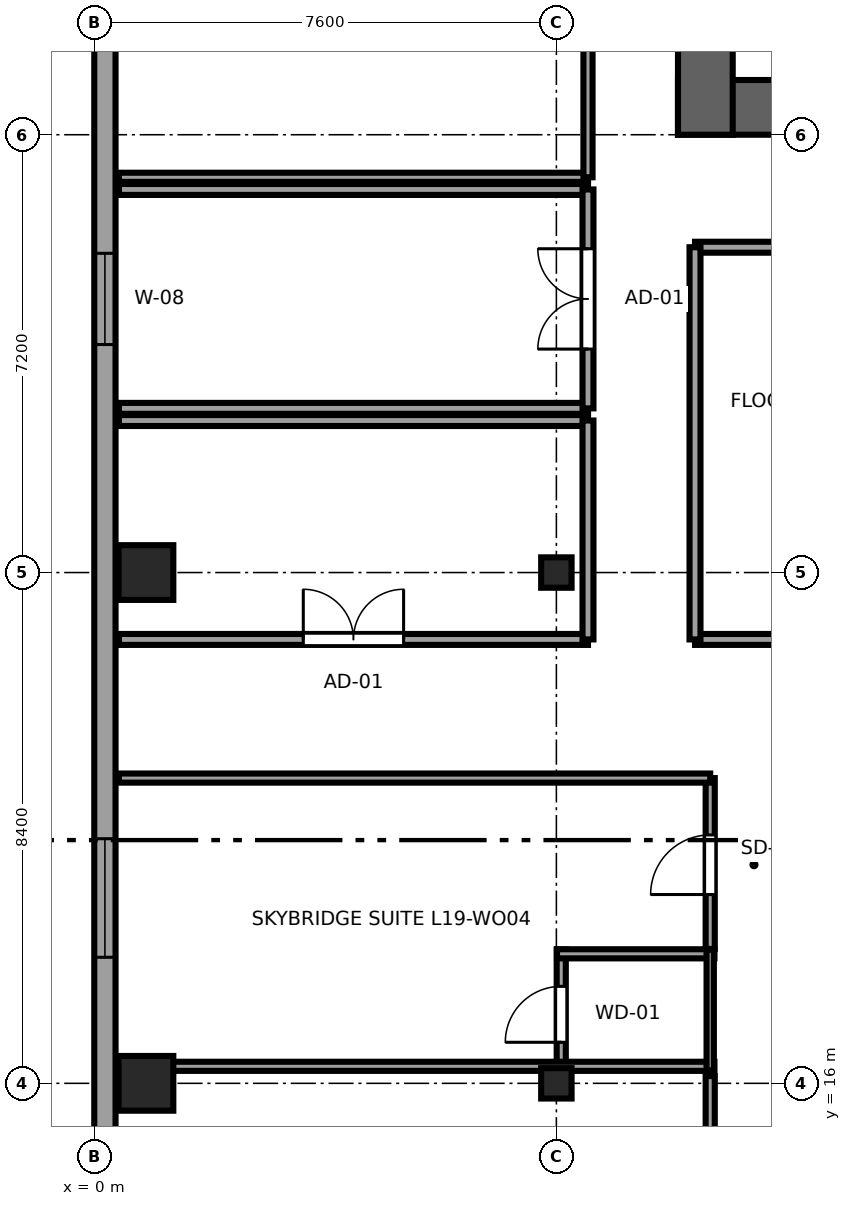
"""IFC4 building model, lengths in metres.
Left out: names, types, materials, properties, quantities, classifications, styles, units other than length and angle.
Written with IfcOpenShell. Run it as: python <this file> out.ifc"""

import sys

from ifc_helpers import new_model, si_unit, direction, frame, frame_2d, origin, origin_2d, place, context, subcontext, project, spatial, rectangle, i_section, extrude, source, transform, mapped, element, fill, save


model = new_model("IFC4")
c1 = context("Model", 3, precision=1e-05, world=origin(), true_north=direction((0.0, 1.0)))
c2 = subcontext(c1, "Body", "Model", "MODEL_VIEW")
j1 = project(units=[si_unit("LENGTHUNIT", "METRE"), si_unit("PLANEANGLEUNIT", "RADIAN")], contexts=[c1])
p1 = place(None, origin())
s1 = spatial("IfcSite", under=j1, at=p1, CompositionType="ELEMENT")
p2 = place(p1, origin())
s2 = spatial("IfcBuilding", under=s1, at=p2, CompositionType="ELEMENT")
p3 = place(p2, frame((0.0, 0.0, 78.15)))
s3 = spatial("IfcBuildingStorey", under=s2, at=p3, CompositionType="ELEMENT", Elevation=78.15)
p4 = place(p3, frame((9.6, 32.05, 0.0), z_axis=(0.0, 0.0, 1.0), x_axis=(1.0, 0.0, 0.0)))
e1 = element("IfcWall", 1, at=p4, inside=s3, PredefinedType="SHEAR", context=c2, shape_type="SweptSolid", body=[
    extrude(rectangle(XDim=26.8, YDim=0.9, at=frame_2d((13.4, 0.0))), origin(), (0.0, 0.0, 1.0), 3.55),
])
p5 = place(p4, frame((6.52, 0.0, 0.0), z_axis=(0.0, 0.0, 1.0), x_axis=(-1.0, 0.0, 0.0)))
e2 = element("IfcOpeningElement", 2, at=p5, cuts=e1, PredefinedType="OPENING", context=c2, shape_type="SweptSolid", body=[
    extrude(rectangle(XDim=1.5, YDim=2.04, at=frame_2d((0.75, 1.02))), frame((0.0, 0.46, 0.0), z_axis=(0.0, -1.0, 0.0), x_axis=(1.0, 0.0, 0.0)), (0.0, 0.0, 1.0), 0.92),
])
p6 = place(p4, frame((14.15, 0.0, 0.0), z_axis=(0.0, 0.0, 1.0), x_axis=(-1.0, 0.0, 0.0)))
e3 = element("IfcOpeningElement", 3, at=p6, cuts=e1, PredefinedType="OPENING", context=c2, shape_type="SweptSolid", body=[
    extrude(rectangle(XDim=1.5, YDim=2.04, at=frame_2d((0.75, 1.02))), frame((0.0, 0.46, 0.0), z_axis=(0.0, -1.0, 0.0), x_axis=(1.0, 0.0, 0.0)), (0.0, 0.0, 1.0), 0.92),
])
p7 = place(p4, frame((20.45, 0.0, 0.0), z_axis=(0.0, 0.0, 1.0), x_axis=(-1.0, 0.0, 0.0)))
e4 = element("IfcOpeningElement", 4, at=p7, cuts=e1, PredefinedType="OPENING", context=c2, shape_type="SweptSolid", body=[
    extrude(rectangle(XDim=1.5, YDim=2.04, at=frame_2d((0.75, 1.02))), frame((0.0, 0.46, 0.0), z_axis=(0.0, -1.0, 0.0), x_axis=(1.0, 0.0, 0.0)), (0.0, 0.0, 1.0), 0.92),
])
p8 = place(p4, frame((8.57, 0.0, 0.0), z_axis=(0.0, 0.0, 1.0), x_axis=(-1.0, 0.0, 0.0)))
e5 = element("IfcOpeningElement", 5, at=p8, cuts=e1, PredefinedType="OPENING", context=c2, shape_type="SweptSolid", body=[
    extrude(rectangle(XDim=0.82, YDim=2.01, at=frame_2d((0.41, 1.005))), frame((0.0, 0.46, 0.0), z_axis=(0.0, -1.0, 0.0), x_axis=(1.0, 0.0, 0.0)), (0.0, 0.0, 1.0), 0.92),
])
p9 = place(p3, frame((10.05, 31.6, 0.0), z_axis=(0.0, 0.0, 1.0), x_axis=(0.0, 1.0, 0.0)))
e6 = element("IfcWall", 6, at=p9, inside=s3, PredefinedType="SHEAR", context=c2, shape_type="SweptSolid", body=[
    extrude(rectangle(XDim=13.6, YDim=0.9, at=frame_2d((6.8, 0.0))), origin(), (0.0, 0.0, 1.0), 3.55),
])
m1 = source(origin(), c2, "Body", "SweptSolid", [
    extrude(rectangle(XDim=0.9, YDim=0.9, at=origin_2d()), origin(), (0.0, 0.0, 1.0), 3.55),
])
for number, where, z_axis, x_axis in (
    (7, (0.85, 16.0, 0.0), (0.0, 0.0, 1.0), (1.0, 0.0, 0.0)),
    (8, (0.85, 24.4, 0.0), (0.0, 0.0, 1.0), (1.0, 0.0, 0.0)),
):
    element("IfcColumn", number, at=place(p3, frame(where, z_axis=z_axis, x_axis=x_axis)), inside=s3, PredefinedType="COLUMN", context=c2, shape_type="MappedRepresentation", body=[
        mapped(m1, transform((0.0, 0.0, 0.0), x_axis=(1.0, 0.0, 0.0), y_axis=(0.0, 1.0, 0.0), z_axis=(0.0, 0.0, 1.0), scale=1.0)),
    ])
m2 = source(origin(), c2, "Body", "SweptSolid", [
    extrude(i_section(OverallWidth=0.5, OverallDepth=0.5, WebThickness=0.022, FlangeThickness=0.034, at=origin_2d()), origin(), (0.0, 0.0, 1.0), 3.55),
])
for number, where, z_axis, x_axis in (
    (9, (7.6, 16.0, 0.0), (0.0, 0.0, 1.0), (1.0, 0.0, 0.0)),
    (10, (7.6, 24.4, 0.0), (0.0, 0.0, 1.0), (1.0, 0.0, 0.0)),
):
    element("IfcColumn", number, at=place(p3, frame(where, z_axis=z_axis, x_axis=x_axis)), inside=s3, PredefinedType="COLUMN", context=c2, shape_type="MappedRepresentation", body=[
        mapped(m2, transform((0.0, 0.0, 0.0), x_axis=(1.0, 0.0, 0.0), y_axis=(0.0, 1.0, 0.0), z_axis=(0.0, 0.0, 1.0), scale=1.0)),
    ])
p10 = place(p3, frame((0.175, 41.383, 0.0), z_axis=(0.0, 0.0, 1.0), x_axis=(0.0, -1.0, 0.0)))
e11 = element("IfcWall", 11, at=p10, inside=s3, PredefinedType="SOLIDWALL", context=c2, shape_type="SweptSolid", body=[
    extrude(rectangle(XDim=36.766, YDim=0.35, at=frame_2d((18.383, 0.0))), origin(), (0.0, 0.0, 1.0), 3.37),
])
p11 = place(p10, frame((1.601, 0.0, 0.68)))
e12 = element("IfcOpeningElement", 12, at=p11, cuts=e11, PredefinedType="OPENING", context=c2, shape_type="SweptSolid", body=[
    extrude(rectangle(XDim=1.95, YDim=1.82, at=frame_2d((0.975, 0.91))), frame((0.0, 0.185, 0.0), z_axis=(0.0, -1.0, 0.0), x_axis=(1.0, 0.0, 0.0)), (0.0, 0.0, 1.0), 0.37),
])
p12 = place(p10, frame((4.503, 0.0, 0.68)))
e13 = element("IfcOpeningElement", 13, at=p12, cuts=e11, PredefinedType="OPENING", context=c2, shape_type="SweptSolid", body=[
    extrude(rectangle(XDim=1.95, YDim=1.82, at=frame_2d((0.975, 0.91))), frame((0.0, 0.185, 0.0), z_axis=(0.0, -1.0, 0.0), x_axis=(1.0, 0.0, 0.0)), (0.0, 0.0, 1.0), 0.37),
])
p13 = place(p10, frame((21.36, 0.0, 0.68)))
e14 = element("IfcOpeningElement", 14, at=p13, cuts=e11, PredefinedType="OPENING", context=c2, shape_type="SweptSolid", body=[
    extrude(rectangle(XDim=1.95, YDim=1.82, at=frame_2d((0.975, 0.91))), frame((0.0, 0.185, 0.0), z_axis=(0.0, -1.0, 0.0), x_axis=(1.0, 0.0, 0.0)), (0.0, 0.0, 1.0), 0.37),
])
p14 = place(p10, frame((26.361, 0.0, 0.68)))
e15 = element("IfcOpeningElement", 15, at=p14, cuts=e11, PredefinedType="OPENING", context=c2, shape_type="SweptSolid", body=[
    extrude(rectangle(XDim=1.95, YDim=1.82, at=frame_2d((0.975, 0.91))), frame((0.0, 0.185, 0.0), z_axis=(0.0, -1.0, 0.0), x_axis=(1.0, 0.0, 0.0)), (0.0, 0.0, 1.0), 0.37),
])
p15 = place(p10, frame((32.333, 0.0, 0.62)))
e16 = element("IfcOpeningElement", 16, at=p15, cuts=e11, PredefinedType="OPENING", context=c2, shape_type="SweptSolid", body=[
    extrude(rectangle(XDim=1.5, YDim=1.55, at=frame_2d((0.75, 0.775))), frame((0.0, 0.185, 0.0), z_axis=(0.0, -1.0, 0.0), x_axis=(1.0, 0.0, 0.0)), (0.0, 0.0, 1.0), 0.37),
])
p16 = place(p10, frame((11.733, 0.0, 0.62)))
e17 = element("IfcOpeningElement", 17, at=p16, cuts=e11, PredefinedType="OPENING", context=c2, shape_type="SweptSolid", body=[
    extrude(rectangle(XDim=1.5, YDim=1.55, at=frame_2d((0.75, 0.775))), frame((0.0, 0.185, 0.0), z_axis=(0.0, -1.0, 0.0), x_axis=(1.0, 0.0, 0.0)), (0.0, 0.0, 1.0), 0.37),
])
p17 = place(p3, frame((7.68, 16.21, 0.0), z_axis=(0.0, 0.0, 1.0), x_axis=(0.0, 1.0, 0.0)))
e18 = element("IfcWall", 18, at=p17, inside=s3, PredefinedType="PARTITIONING", context=c2, shape_type="SweptSolid", body=[
    extrude(rectangle(XDim=1.99, YDim=0.15, at=frame_2d((0.995, 0.0))), origin(), (0.0, 0.0, 1.0), 2.827),
])
p18 = place(p17, frame((0.465, 0.0, 0.0)))
e19 = element("IfcOpeningElement", 19, at=p18, cuts=e18, PredefinedType="OPENING", context=c2, shape_type="SweptSolid", body=[
    extrude(rectangle(XDim=0.92, YDim=2.01, at=frame_2d((0.46, 1.005))), frame((0.0, 0.085, 0.0), z_axis=(0.0, -1.0, 0.0), x_axis=(1.0, 0.0, 0.0)), (0.0, 0.0, 1.0), 0.17),
])
p19 = place(p3, frame((0.405, 16.28, 0.0), z_axis=(0.0, 0.0, 1.0), x_axis=(1.0, 0.0, 0.0)))
e20 = element("IfcWall", 20, at=p19, inside=s3, PredefinedType="PARTITIONING", context=c2, shape_type="SweptSolid", body=[
    extrude(rectangle(XDim=9.795, YDim=0.15, at=frame_2d((4.897, 0.0))), origin(), (0.0, 0.0, 1.0), 3.37),
])
p20 = place(p3, frame((7.61, 18.13, 0.0), z_axis=(0.0, 0.0, 1.0), x_axis=(1.0, 0.0, 0.0)))
e21 = element("IfcWall", 21, at=p20, inside=s3, PredefinedType="PARTITIONING", context=c2, shape_type="SweptSolid", body=[
    extrude(rectangle(XDim=2.59, YDim=0.15, at=frame_2d((1.295, 0.0))), origin(), (0.0, 0.0, 1.0), 3.37),
])
p21 = place(p3, frame((10.13, 16.21, 0.0), z_axis=(0.0, 0.0, 1.0), x_axis=(0.0, 1.0, 0.0)))
e22 = element("IfcWall", 22, at=p21, inside=s3, PredefinedType="PLUMBINGWALL", context=c2, shape_type="SweptSolid", body=[
    extrude(rectangle(XDim=1.99, YDim=0.12, at=frame_2d((0.995, 0.0))), origin(), (0.0, 0.0, 1.0), 3.37),
])
p22 = place(p3, frame((10.13, 13.075, 0.0), z_axis=(0.0, 0.0, 1.0), x_axis=(0.0, 1.0, 0.0)))
e23 = element("IfcWall", 23, at=p22, inside=s3, PredefinedType="PARTITIONING", context=c2, shape_type="SweptSolid", body=[
    extrude(rectangle(XDim=3.045, YDim=0.15, at=frame_2d((1.522, 0.0))), origin(), (0.0, 0.0, 1.0), 3.37),
])
p23 = place(p22, frame((1.012, 0.0, 0.0)))
e24 = element("IfcOpeningElement", 24, at=p23, cuts=e23, PredefinedType="OPENING", context=c2, shape_type="SweptSolid", body=[
    extrude(rectangle(XDim=0.98, YDim=2.12, at=frame_2d((0.49, 1.06))), frame((0.0, 0.085, 0.0), z_axis=(0.0, -1.0, 0.0), x_axis=(1.0, 0.0, 0.0)), (0.0, 0.0, 1.0), 0.17),
])
p24 = place(p3, frame((10.13, 18.21, 0.0), z_axis=(0.0, 0.0, 1.0), x_axis=(0.0, 1.0, 0.0)))
e25 = element("IfcWall", 25, at=p24, inside=s3, PredefinedType="PARTITIONING", context=c2, shape_type="SweptSolid", body=[
    extrude(rectangle(XDim=2.81, YDim=0.15, at=frame_2d((1.405, 0.0))), origin(), (0.0, 0.0, 1.0), 3.37),
])
p25 = place(p24, frame((0.895, 0.0, 0.0)))
e26 = element("IfcOpeningElement", 26, at=p25, cuts=e25, PredefinedType="OPENING", context=c2, shape_type="SweptSolid", body=[
    extrude(rectangle(XDim=0.98, YDim=2.12, at=frame_2d((0.49, 1.06))), frame((0.0, 0.085, 0.0), z_axis=(0.0, -1.0, 0.0), x_axis=(1.0, 0.0, 0.0)), (0.0, 0.0, 1.0), 0.17),
])
p26 = place(p3, frame((0.405, 21.02, 0.0), z_axis=(0.0, 0.0, 1.0), x_axis=(1.0, 0.0, 0.0)))
e27 = element("IfcWall", 27, at=p26, inside=s3, PredefinedType="PARTITIONING", context=c2, shape_type="SweptSolid", body=[
    extrude(rectangle(XDim=9.725, YDim=0.15, at=frame_2d((4.862, 0.0))), origin(), (0.0, 0.0, 1.0), 3.37),
])
p27 = place(p3, frame((0.405, 23.3, 0.0), z_axis=(0.0, 0.0, 1.0), x_axis=(1.0, 0.0, 0.0)))
e28 = element("IfcWall", 28, at=p27, inside=s3, PredefinedType="PARTITIONING", context=c2, shape_type="SweptSolid", body=[
    extrude(rectangle(XDim=7.715, YDim=0.18, at=frame_2d((3.857, 0.0))), origin(), (0.0, 0.0, 1.0), 3.37),
])
p28 = place(p27, frame((3.032, 0.0, 0.0)))
e29 = element("IfcOpeningElement", 29, at=p28, cuts=e28, PredefinedType="OPENING", context=c2, shape_type="SweptSolid", body=[
    extrude(rectangle(XDim=1.65, YDim=2.15, at=frame_2d((0.825, 1.075))), frame((0.0, 0.1, 0.0), z_axis=(0.0, -1.0, 0.0), x_axis=(1.0, 0.0, 0.0)), (0.0, 0.0, 1.0), 0.2),
])
p29 = place(p3, frame((0.405, 26.9, 0.0), z_axis=(0.0, 0.0, 1.0), x_axis=(1.0, 0.0, 0.0)))
e30 = element("IfcWall", 30, at=p29, inside=s3, PredefinedType="PARTITIONING", context=c2, shape_type="SweptSolid", body=[
    extrude(rectangle(XDim=7.715, YDim=0.18, at=frame_2d((3.857, 0.0))), origin(), (0.0, 0.0, 1.0), 3.37),
])
p30 = place(p3, frame((8.12, 23.3, 0.0), z_axis=(0.0, 0.0, 1.0), x_axis=(0.0, 1.0, 0.0)))
e31 = element("IfcWall", 31, at=p30, inside=s3, PredefinedType="PARTITIONING", context=c2, shape_type="SweptSolid", body=[
    extrude(rectangle(XDim=3.6, YDim=0.18, at=frame_2d((1.8, 0.0))), origin(), (0.0, 0.0, 1.0), 3.37),
])
for number, where, z_axis, x_axis in (
    (32, (0.405, 27.1, 0.0), (0.0, 0.0, 1.0), (1.0, 0.0, 0.0)),
    (33, (0.405, 30.7, 0.0), (0.0, 0.0, 1.0), (1.0, 0.0, 0.0)),
):
    element("IfcWall", number, at=place(p3, frame(where, z_axis=z_axis, x_axis=x_axis)), inside=s3, PredefinedType="PARTITIONING", context=c2, shape_type="SweptSolid", body=[
        extrude(rectangle(XDim=7.715, YDim=0.18, at=frame_2d((3.857, 0.0))), origin(), (0.0, 0.0, 1.0), 3.37),
    ])
p31 = place(p3, frame((8.12, 27.1, 0.0), z_axis=(0.0, 0.0, 1.0), x_axis=(0.0, 1.0, 0.0)))
e34 = element("IfcWall", 34, at=p31, inside=s3, PredefinedType="PARTITIONING", context=c2, shape_type="SweptSolid", body=[
    extrude(rectangle(XDim=3.6, YDim=0.18, at=frame_2d((1.8, 0.0))), origin(), (0.0, 0.0, 1.0), 3.37),
])
p32 = place(p31, frame((0.975, 0.0, 0.0)))
e35 = element("IfcOpeningElement", 35, at=p32, cuts=e34, PredefinedType="OPENING", context=c2, shape_type="SweptSolid", body=[
    extrude(rectangle(XDim=1.65, YDim=2.15, at=frame_2d((0.825, 1.075))), frame((0.0, 0.1, 0.0), z_axis=(0.0, -1.0, 0.0), x_axis=(1.0, 0.0, 0.0)), (0.0, 0.0, 1.0), 0.2),
])
p33 = place(p3, frame((0.405, 30.9, 0.0), z_axis=(0.0, 0.0, 1.0), x_axis=(1.0, 0.0, 0.0)))
e36 = element("IfcWall", 36, at=p33, inside=s3, PredefinedType="PARTITIONING", context=c2, shape_type="SweptSolid", body=[
    extrude(rectangle(XDim=7.715, YDim=0.15, at=frame_2d((3.857, 0.0))), origin(), (0.0, 0.0, 1.0), 3.37),
])
p34 = place(p3, frame((8.12, 30.9, 0.0), z_axis=(0.0, 0.0, 1.0), x_axis=(0.0, 1.0, 0.0)))
e37 = element("IfcWall", 37, at=p34, inside=s3, PredefinedType="PARTITIONING", context=c2, shape_type="SweptSolid", body=[
    extrude(rectangle(XDim=14.695, YDim=0.15, at=frame_2d((7.348, 0.0))), origin(), (0.0, 0.0, 1.0), 3.37),
])
p35 = place(p34, frame((6.522, 0.0, 0.0)))
e38 = element("IfcOpeningElement", 38, at=p35, cuts=e37, PredefinedType="OPENING", context=c2, shape_type="SweptSolid", body=[
    extrude(rectangle(XDim=1.65, YDim=2.15, at=frame_2d((0.825, 1.075))), frame((0.0, 0.085, 0.0), z_axis=(0.0, -1.0, 0.0), x_axis=(1.0, 0.0, 0.0)), (0.0, 0.0, 1.0), 0.17),
])
p36 = place(p3, frame((9.88, 23.3, 0.0), z_axis=(0.0, 0.0, 1.0), x_axis=(1.0, 0.0, 0.0)))
e39 = element("IfcWall", 39, at=p36, inside=s3, PredefinedType="PARTITIONING", context=c2, shape_type="SweptSolid", body=[
    extrude(rectangle(XDim=4.22, YDim=0.18, at=frame_2d((2.11, 0.0))), origin(), (0.0, 0.0, 1.0), 3.37),
])
p37 = place(p36, frame((1.285, 0.0, 0.0)))
e40 = element("IfcOpeningElement", 40, at=p37, cuts=e39, PredefinedType="OPENING", context=c2, shape_type="SweptSolid", body=[
    extrude(rectangle(XDim=1.65, YDim=2.15, at=frame_2d((0.825, 1.075))), frame((0.0, 0.1, 0.0), z_axis=(0.0, -1.0, 0.0), x_axis=(1.0, 0.0, 0.0)), (0.0, 0.0, 1.0), 0.2),
])
p38 = place(p3, frame((9.88, 29.75, 0.0), z_axis=(0.0, 0.0, 1.0), x_axis=(1.0, 0.0, 0.0)))
e41 = element("IfcWall", 41, at=p38, inside=s3, PredefinedType="PARTITIONING", context=c2, shape_type="SweptSolid", body=[
    extrude(rectangle(XDim=4.22, YDim=0.18, at=frame_2d((2.11, 0.0))), origin(), (0.0, 0.0, 1.0), 3.37),
])
p39 = place(p3, frame((9.88, 23.3, 0.0), z_axis=(0.0, 0.0, 1.0), x_axis=(0.0, 1.0, 0.0)))
e42 = element("IfcWall", 42, at=p39, inside=s3, PredefinedType="PARTITIONING", context=c2, shape_type="SweptSolid", body=[
    extrude(rectangle(XDim=6.45, YDim=0.18, at=frame_2d((3.225, 0.0))), origin(), (0.0, 0.0, 1.0), 3.37),
])
m3 = source(origin(), c2, "Body", "SweptSolid", [
    extrude(rectangle(XDim=1.95, YDim=1.82, at=frame_2d((0.975, 0.91))), frame((0.0, 0.09, 0.0), z_axis=(0.0, -1.0, 0.0), x_axis=(1.0, 0.0, 0.0)), (0.0, 0.0, 1.0), 0.06),
])
p40 = place(p13, origin())
e43 = element("IfcWindow", 43, at=p40, inside=s3, PartitioningType="DOUBLE_PANEL_VERTICAL", PredefinedType="WINDOW", context=c2, shape_type="MappedRepresentation", body=[
    mapped(m3, transform((0.0, 0.0, 0.0), x_axis=(1.0, 0.0, 0.0), y_axis=(0.0, 1.0, 0.0), z_axis=(0.0, 0.0, 1.0), scale=1.0)),
])
fill(e14, e43)
m4 = source(origin(), c2, "Body", "SweptSolid", [
    extrude(rectangle(XDim=1.5, YDim=1.55, at=frame_2d((0.75, 0.775))), frame((0.0, 0.09, 0.0), z_axis=(0.0, -1.0, 0.0), x_axis=(1.0, 0.0, 0.0)), (0.0, 0.0, 1.0), 0.06),
])
p41 = place(p16, origin())
e44 = element("IfcWindow", 44, at=p41, inside=s3, PartitioningType="SINGLE_PANEL", PredefinedType="WINDOW", context=c2, shape_type="MappedRepresentation", body=[
    mapped(m4, transform((0.0, 0.0, 0.0), x_axis=(1.0, 0.0, 0.0), y_axis=(0.0, 1.0, 0.0), z_axis=(0.0, 0.0, 1.0), scale=1.0)),
])
fill(e17, e44)
m5 = source(origin(), c2, "Body", "SweptSolid", [
    extrude(rectangle(XDim=0.92, YDim=2.01, at=frame_2d((0.46, 1.005))), frame((0.0, 0.025, 0.0), z_axis=(0.0, -1.0, 0.0), x_axis=(1.0, 0.0, 0.0)), (0.0, 0.0, 1.0), 0.05),
])
p42 = place(p18, origin())
e45 = element("IfcDoor", 45, at=p42, inside=s3, OperationType="SINGLE_SWING_LEFT", PredefinedType="DOOR", context=c2, shape_type="MappedRepresentation", body=[
    mapped(m5, transform((0.0, 0.0, 0.0), x_axis=(1.0, 0.0, 0.0), y_axis=(0.0, 1.0, 0.0), z_axis=(0.0, 0.0, 1.0), scale=1.0)),
])
fill(e19, e45)
m6 = source(origin(), c2, "Body", "SweptSolid", [
    extrude(rectangle(XDim=0.98, YDim=2.12, at=frame_2d((0.49, 1.06))), frame((0.0, 0.025, 0.0), z_axis=(0.0, -1.0, 0.0), x_axis=(1.0, 0.0, 0.0)), (0.0, 0.0, 1.0), 0.05),
])
p43 = place(p25, origin())
e46 = element("IfcDoor", 46, at=p43, inside=s3, OperationType="SINGLE_SWING_LEFT", PredefinedType="DOOR", context=c2, shape_type="MappedRepresentation", body=[
    mapped(m6, transform((0.0, 0.0, 0.0), x_axis=(1.0, 0.0, 0.0), y_axis=(0.0, 1.0, 0.0), z_axis=(0.0, 0.0, 1.0), scale=1.0)),
])
fill(e26, e46)
m7 = source(origin(), c2, "Body", "SweptSolid", [
    extrude(rectangle(XDim=1.65, YDim=2.15, at=frame_2d((0.825, 1.075))), frame((0.0, 0.025, 0.0), z_axis=(0.0, -1.0, 0.0), x_axis=(1.0, 0.0, 0.0)), (0.0, 0.0, 1.0), 0.05),
])
p44 = place(p28, origin())
e47 = element("IfcDoor", 47, at=p44, inside=s3, OperationType="DOUBLE_DOOR_SINGLE_SWING", PredefinedType="DOOR", context=c2, shape_type="MappedRepresentation", body=[
    mapped(m7, transform((0.0, 0.0, 0.0), x_axis=(1.0, 0.0, 0.0), y_axis=(0.0, 1.0, 0.0), z_axis=(0.0, 0.0, 1.0), scale=1.0)),
])
fill(e29, e47)
p45 = place(p32, origin())
e48 = element("IfcDoor", 48, at=p45, inside=s3, OperationType="DOUBLE_DOOR_SINGLE_SWING", PredefinedType="DOOR", context=c2, shape_type="MappedRepresentation", body=[
    mapped(m7, transform((0.0, 0.0, 0.0), x_axis=(1.0, 0.0, 0.0), y_axis=(0.0, 1.0, 0.0), z_axis=(0.0, 0.0, 1.0), scale=1.0)),
])
fill(e35, e48)
save(model, sys.argv[1])
